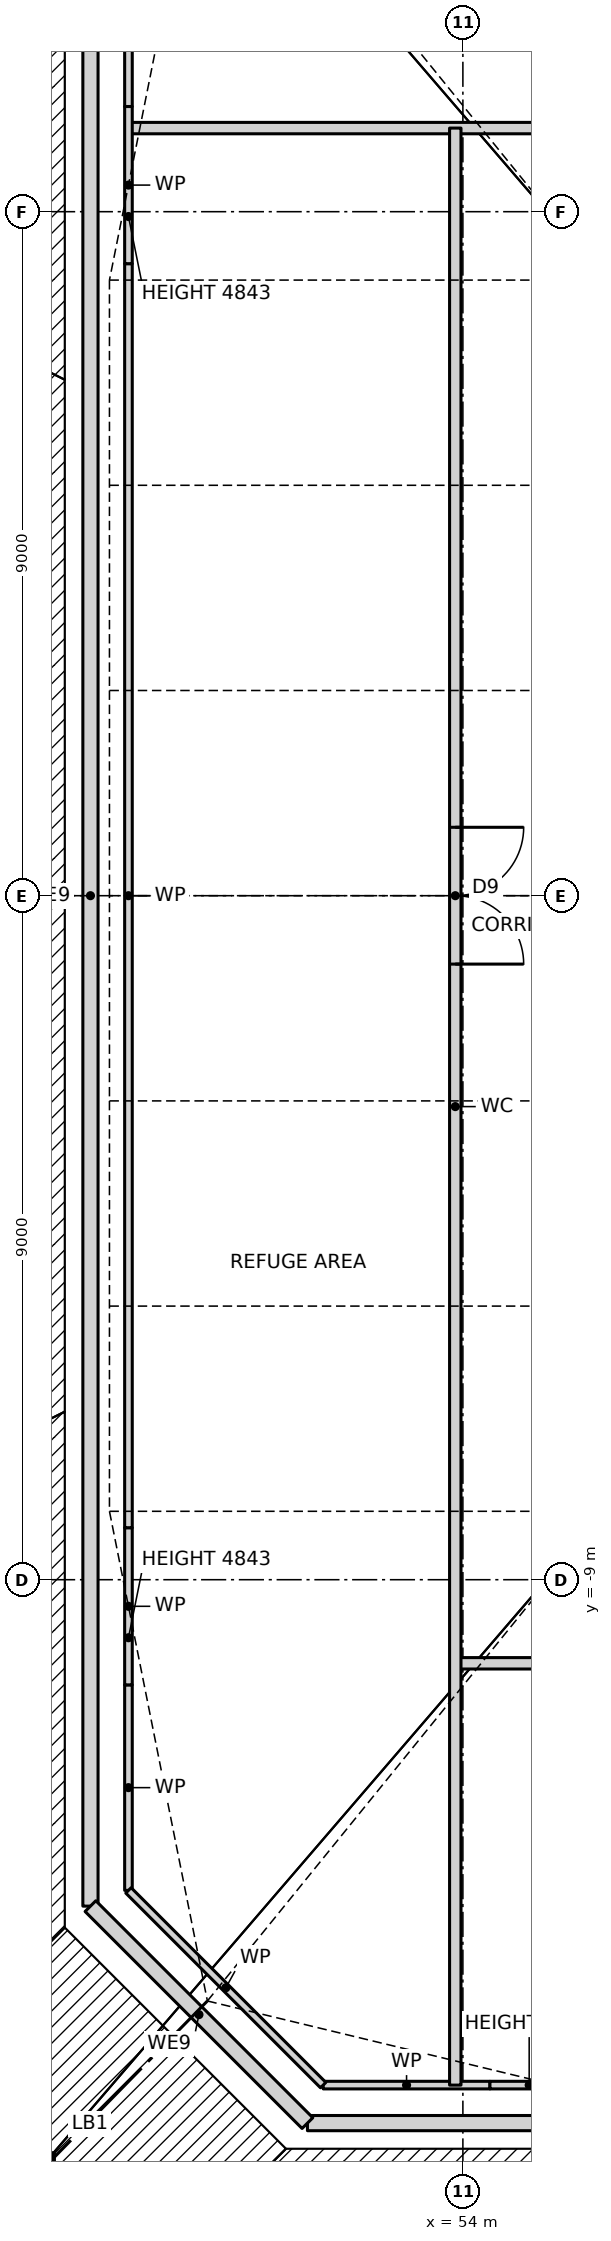
"""IFC4 building model, lengths in metres.
Left out: names, types, materials, properties, quantities, classifications, styles, units other than length and angle.
Written with IfcOpenShell. Run it as: python <this file> out.ifc"""

import sys

from ifc_helpers import new_model, si_unit, direction, frame, frame_2d, origin, origin_2d, place, context, subcontext, project, spatial, rectangle, i_section, extrude, clip, halfspace, element, fill, save


model = new_model("IFC4")
c1 = context("Model", 3, precision=1e-05, world=origin(), true_north=direction((0.0, 1.0)))
c2 = subcontext(c1, "Body", "Model", "MODEL_VIEW")
j1 = project(units=[si_unit("LENGTHUNIT", "METRE"), si_unit("PLANEANGLEUNIT", "RADIAN")], contexts=[c1])
p1 = place(None, origin())
s1 = spatial("IfcSite", under=j1, at=p1, CompositionType="ELEMENT")
p2 = place(p1, origin())
s2 = spatial("IfcBuilding", under=s1, at=p2, CompositionType="ELEMENT")
p3 = place(p2, frame((0.0, 0.0, 74.5)))
s3 = spatial("IfcBuildingStorey", under=s2, at=p3, CompositionType="ELEMENT", Elevation=74.5)
p4 = place(p3, frame((48.394, -16.797, 0.0), z_axis=(0.330551321937, 0.331953334069, 0.883483337458), x_axis=(-0.708601594959, 0.705608800698, 0.0)))
e1 = element("IfcColumn", 1, at=p4, inside=s3, PredefinedType="COLUMN", context=c2, shape_type="Clipping", body=[
    clip(clip(extrude(i_section(OverallWidth=0.424, OverallDepth=0.475, WebThickness=0.048, FlangeThickness=0.077, at=origin_2d()), origin(), (0.0, 0.0, 1.0), 6.791), halfspace(frame((0.0, 0.0, 0.0), z_axis=(0.0, -0.468462583814, -0.883483337458), x_axis=(-0.708601594959, -0.62339361818, 0.330551321937)), False)), halfspace(frame((0.0, 2.811, 5.301), z_axis=(0.0, 0.468462583814, 0.883483337458), x_axis=(-0.708601594959, -0.62339361818, 0.330551321937)), False)),
])
p5 = place(p3, frame((54.9, -18.15, 0.0), z_axis=(0.206163197348, 0.343580475001, 0.916214600002), x_axis=(-0.857476506072, 0.514523120505, 0.0)))
e2 = element("IfcColumn", 2, at=p5, inside=s3, PredefinedType="COLUMN", context=c2, shape_type="Clipping", body=[
    clip(clip(extrude(i_section(OverallWidth=0.424, OverallDepth=0.475, WebThickness=0.048, FlangeThickness=0.077, at=origin_2d()), origin(), (0.0, 0.0, 1.0), 6.549), halfspace(frame((0.0, 0.0, 0.0), z_axis=(0.0, -0.400687916891, -0.916214600002), x_axis=(-0.857476506072, -0.471413595046, 0.206163197348)), False)), halfspace(frame((0.0, 2.404, 5.497), z_axis=(0.0, 0.400687916891, 0.916214600002), x_axis=(-0.857476506072, -0.471413595046, 0.206163197348)), False)),
])
p6 = place(p3, frame((47.1, 9.45, 0.0), z_axis=(0.343583115532, -0.206127500627, 0.91622164142), x_axis=(0.514454704863, 0.857517554715, 0.0)))
e3 = element("IfcColumn", 3, at=p6, inside=s3, PredefinedType="COLUMN", context=c2, shape_type="Clipping", body=[
    clip(clip(extrude(i_section(OverallWidth=0.424, OverallDepth=0.475, WebThickness=0.048, FlangeThickness=0.077, at=origin_2d()), origin(), (0.0, 0.0, 1.0), 6.549), halfspace(frame((0.0, 0.0, 0.0), z_axis=(0.0, -0.400671815572, -0.91622164142), x_axis=(0.514454704863, -0.785676141527, 0.343583115532)), False)), halfspace(frame((0.0, 2.404, 5.497), z_axis=(0.0, 0.400671815572, 0.91622164142), x_axis=(0.514454704863, -0.785676141527, 0.343583115532)), False)),
])
p7 = place(p3, frame((47.1, 3.15, 0.0), z_axis=(0.350261033367, -0.070044605522, 0.934029422311), x_axis=(0.196095673508, 0.980584767795, 0.0)))
e4 = element("IfcColumn", 4, at=p7, inside=s3, PredefinedType="COLUMN", context=c2, shape_type="Clipping", body=[
    clip(clip(extrude(i_section(OverallWidth=0.424, OverallDepth=0.475, WebThickness=0.048, FlangeThickness=0.077, at=origin_2d()), origin(), (0.0, 0.0, 1.0), 6.424), halfspace(frame((0.0, 0.0, 0.0), z_axis=(0.0, -0.357196078167, -0.934029422311), x_axis=(0.196095673508, -0.91589502419, 0.350261033367)), False)), halfspace(frame((0.0, 2.143, 5.604), z_axis=(0.0, 0.357196078167, 0.934029422311), x_axis=(0.196095673508, -0.91589502419, 0.350261033367)), False)),
])
p8 = place(p3, frame((47.1, -3.15, 0.0), z_axis=(0.350261033367, 0.070044605522, 0.934029422311), x_axis=(-0.196095673508, 0.980584767795, 0.0)))
e5 = element("IfcColumn", 5, at=p8, inside=s3, PredefinedType="COLUMN", context=c2, shape_type="Clipping", body=[
    clip(clip(extrude(i_section(OverallWidth=0.424, OverallDepth=0.475, WebThickness=0.048, FlangeThickness=0.077, at=origin_2d()), origin(), (0.0, 0.0, 1.0), 6.424), halfspace(frame((0.0, 0.0, 0.0), z_axis=(0.0, -0.357196078167, -0.934029422311), x_axis=(-0.196095673508, -0.91589502419, 0.350261033367)), False)), halfspace(frame((0.0, 2.143, 5.604), z_axis=(0.0, 0.357196078167, 0.934029422311), x_axis=(-0.196095673508, -0.91589502419, 0.350261033367)), False)),
])
p9 = place(p3, frame((47.1, -9.45, 0.0), z_axis=(0.343583115532, 0.206127500627, 0.91622164142), x_axis=(-0.514454704863, 0.857517554715, 0.0)))
e6 = element("IfcColumn", 6, at=p9, inside=s3, PredefinedType="COLUMN", context=c2, shape_type="Clipping", body=[
    clip(clip(extrude(i_section(OverallWidth=0.424, OverallDepth=0.475, WebThickness=0.048, FlangeThickness=0.077, at=origin_2d()), origin(), (0.0, 0.0, 1.0), 6.549), halfspace(frame((0.0, 0.0, 0.0), z_axis=(0.0, -0.400671815572, -0.91622164142), x_axis=(-0.514454704863, -0.785676141527, 0.343583115532)), False)), halfspace(frame((0.0, 2.404, 5.497), z_axis=(0.0, 0.400671815572, 0.91622164142), x_axis=(-0.514454704863, -0.785676141527, 0.343583115532)), False)),
])
p10 = place(p3, frame((51.955, -16.15, 0.0), z_axis=(0.0, 0.0, 1.0), x_axis=(1.0, 0.0, 0.0)))
e7 = element("IfcWall", 7, at=p10, inside=s3, PredefinedType="PARTITIONING", context=c2, shape_type="SweptSolid", body=[
    extrude(rectangle(XDim=22.09, YDim=0.2, at=frame_2d((11.045, 0.0))), origin(), (0.0, 0.0, 1.0), 5.7),
])
p11 = place(p3, frame((49.1, 13.295, 0.0), z_axis=(0.0, 0.0, 1.0), x_axis=(0.0, -1.0, 0.0)))
e8 = element("IfcWall", 8, at=p11, inside=s3, PredefinedType="PARTITIONING", context=c2, shape_type="SweptSolid", body=[
    extrude(rectangle(XDim=26.59, YDim=0.2, at=frame_2d((13.295, 0.0))), origin(), (0.0, 0.0, 1.0), 5.7),
])
p12 = place(p3, frame((49.1, -13.295, 0.0), z_axis=(0.0, 0.0, 1.0), x_axis=(0.707106781187, -0.707106781187, 0.0)))
e9 = element("IfcWall", 9, at=p12, inside=s3, PredefinedType="PARTITIONING", context=c2, shape_type="SweptSolid", body=[
    extrude(rectangle(XDim=4.038, YDim=0.2, at=frame_2d((2.019, 0.0))), origin(), (0.0, 0.0, 1.0), 5.7),
])
p13 = place(p3, frame((52.162, -15.65, 0.0), z_axis=(0.0, 0.0, 1.0), x_axis=(1.0, 0.0, 0.0)))
e10 = element("IfcWall", 10, at=p13, inside=s3, PredefinedType="PARTITIONING", context=c2, shape_type="SweptSolid", body=[
    extrude(rectangle(XDim=2.194, YDim=0.1, at=frame_2d((1.097, 0.0))), origin(), (0.0, 0.0, 1.0), 5.77),
])
p14 = place(p3, frame((53.9, -10.1, 0.0), z_axis=(0.0, 0.0, 1.0), x_axis=(1.0, 0.0, 0.0)))
e11 = element("IfcWall", 11, at=p14, inside=s3, PredefinedType="PARTITIONING", context=c2, shape_type="SweptSolid", body=[
    extrude(rectangle(XDim=22.5, YDim=0.15, at=frame_2d((11.25, 0.0))), origin(), (0.0, 0.0, 1.0), 5.77),
])
p15 = place(p14, frame((3.6, 0.0, 0.0)))
e12 = element("IfcOpeningElement", 12, at=p15, cuts=e11, PredefinedType="OPENING", context=c2, shape_type="SweptSolid", body=[
    extrude(rectangle(XDim=1.8, YDim=2.1, at=frame_2d((0.9, 1.05))), frame((0.0, 0.085, 0.0), z_axis=(0.0, -1.0, 0.0), x_axis=(1.0, 0.0, 0.0)), (0.0, 0.0, 1.0), 0.17),
])
p16 = place(p14, frame((12.7, 0.0, 0.0)))
e13 = element("IfcOpeningElement", 13, at=p16, cuts=e11, PredefinedType="OPENING", context=c2, shape_type="SweptSolid", body=[
    extrude(rectangle(XDim=1.8, YDim=2.1, at=frame_2d((0.9, 1.05))), frame((0.0, 0.085, 0.0), z_axis=(0.0, -1.0, 0.0), x_axis=(1.0, 0.0, 0.0)), (0.0, 0.0, 1.0), 0.17),
])
p17 = place(p3, frame((49.6, 10.1, 0.0), z_axis=(0.0, 0.0, 1.0), x_axis=(1.0, 0.0, 0.0)))
e14 = element("IfcWall", 14, at=p17, inside=s3, PredefinedType="PARTITIONING", context=c2, shape_type="SweptSolid", body=[
    extrude(rectangle(XDim=22.5, YDim=0.15, at=frame_2d((11.25, 0.0))), origin(), (0.0, 0.0, 1.0), 5.77),
])
p18 = place(p17, frame((17.6, 0.0, 0.0)))
e15 = element("IfcOpeningElement", 15, at=p18, cuts=e14, PredefinedType="OPENING", context=c2, shape_type="SweptSolid", body=[
    extrude(rectangle(XDim=1.8, YDim=2.1, at=frame_2d((0.9, 1.05))), frame((0.0, 0.085, 0.0), z_axis=(0.0, -1.0, 0.0), x_axis=(1.0, 0.0, 0.0)), (0.0, 0.0, 1.0), 0.17),
])
p19 = place(p17, frame((8.5, 0.0, 0.0)))
e16 = element("IfcOpeningElement", 16, at=p19, cuts=e14, PredefinedType="OPENING", context=c2, shape_type="SweptSolid", body=[
    extrude(rectangle(XDim=1.8, YDim=2.1, at=frame_2d((0.9, 1.05))), frame((0.0, 0.085, 0.0), z_axis=(0.0, -1.0, 0.0), x_axis=(1.0, 0.0, 0.0)), (0.0, 0.0, 1.0), 0.17),
])
p20 = place(p3, frame((53.9, -15.65, 0.0), z_axis=(0.0, 0.0, 1.0), x_axis=(0.0, 1.0, 0.0)))
e17 = element("IfcWall", 17, at=p20, inside=s3, PredefinedType="PARTITIONING", context=c2, shape_type="SweptSolid", body=[
    extrude(rectangle(XDim=25.75, YDim=0.15, at=frame_2d((12.875, 0.0))), origin(), (0.0, 0.0, 1.0), 5.77),
])
p21 = place(p20, frame((14.75, 0.0, 0.0)))
e18 = element("IfcOpeningElement", 18, at=p21, cuts=e17, PredefinedType="OPENING", context=c2, shape_type="SweptSolid", body=[
    extrude(rectangle(XDim=1.8, YDim=2.1, at=frame_2d((0.9, 1.05))), frame((0.0, 0.085, 0.0), z_axis=(0.0, -1.0, 0.0), x_axis=(1.0, 0.0, 0.0)), (0.0, 0.0, 1.0), 0.17),
])
p22 = place(p3, frame((49.6, -13.088, 0.0), z_axis=(0.0, 0.0, 1.0), x_axis=(0.0, 1.0, 0.0)))
e19 = element("IfcWall", 19, at=p22, inside=s3, PredefinedType="PARTITIONING", context=c2, shape_type="SweptSolid", body=[
    extrude(rectangle(XDim=2.704, YDim=0.1, at=frame_2d((1.352, 0.0))), origin(), (0.0, 0.0, 1.0), 5.77),
])
p23 = place(p3, frame((52.162, -15.65, 0.0), z_axis=(0.0, 0.0, 1.0), x_axis=(-0.707106781187, 0.707106781187, 0.0)))
e20 = element("IfcWall", 20, at=p23, inside=s3, PredefinedType="PARTITIONING", context=c2, shape_type="SweptSolid", body=[
    extrude(rectangle(XDim=3.623, YDim=0.1, at=frame_2d((1.812, 0.0))), origin(), (0.0, 0.0, 1.0), 5.77),
])
p24 = place(p3, frame((54.356, -15.65, 0.0), z_axis=(0.0, 0.0, 1.0), x_axis=(1.0, 0.0, 0.0)))
e21 = element("IfcWall", 21, at=p24, inside=s3, PredefinedType="PARTITIONING", context=c2, shape_type="SweptSolid", body=[
    extrude(rectangle(XDim=1.721, YDim=0.1, at=frame_2d((0.86, 0.0))), origin(), (0.0, 0.0, 1.0), 4.843),
])
p25 = place(p3, frame((49.6, -10.384, 0.0), z_axis=(0.0, 0.0, 1.0), x_axis=(0.0, 1.0, 0.0)))
e22 = element("IfcWall", 22, at=p25, inside=s3, PredefinedType="PARTITIONING", context=c2, shape_type="SweptSolid", body=[
    extrude(rectangle(XDim=2.068, YDim=0.1, at=frame_2d((1.034, 0.0))), origin(), (0.0, 0.0, 1.0), 4.843),
])
p26 = place(p3, frame((49.6, -8.316, 0.0), z_axis=(0.0, 0.0, 1.0), x_axis=(0.0, 1.0, 0.0)))
e23 = element("IfcWall", 23, at=p26, inside=s3, PredefinedType="PARTITIONING", context=c2, shape_type="SweptSolid", body=[
    extrude(rectangle(XDim=16.632, YDim=0.1, at=frame_2d((8.316, 0.0))), origin(), (0.0, 0.0, 1.0), 5.77),
])
p27 = place(p3, frame((49.6, 8.316, 0.0), z_axis=(0.0, 0.0, 1.0), x_axis=(0.0, 1.0, 0.0)))
e24 = element("IfcWall", 24, at=p27, inside=s3, PredefinedType="PARTITIONING", context=c2, shape_type="SweptSolid", body=[
    extrude(rectangle(XDim=2.068, YDim=0.1, at=frame_2d((1.034, 0.0))), origin(), (0.0, 0.0, 1.0), 4.843),
])
p28 = place(p3, frame((49.6, 10.384, 0.0), z_axis=(0.0, 0.0, 1.0), x_axis=(0.0, 1.0, 0.0)))
e25 = element("IfcWall", 25, at=p28, inside=s3, PredefinedType="PARTITIONING", context=c2, shape_type="SweptSolid", body=[
    extrude(rectangle(XDim=2.704, YDim=0.1, at=frame_2d((1.352, 0.0))), origin(), (0.0, 0.0, 1.0), 5.77),
])
p29 = place(p21, frame((1.8, 0.0, 0.0), z_axis=(0.0, 0.0, 1.0), x_axis=(-1.0, 0.0, 0.0)))
e26 = element("IfcDoor", 26, at=p29, inside=s3, OperationType="DOUBLE_DOOR_SINGLE_SWING", PredefinedType="DOOR", context=c2, shape_type="SweptSolid", body=[
    extrude(rectangle(XDim=1.8, YDim=2.1, at=frame_2d((0.9, 1.05))), frame((0.0, 0.025, 0.0), z_axis=(0.0, -1.0, 0.0), x_axis=(1.0, 0.0, 0.0)), (0.0, 0.0, 1.0), 0.05),
])
fill(e18, e26)
save(model, sys.argv[1])
